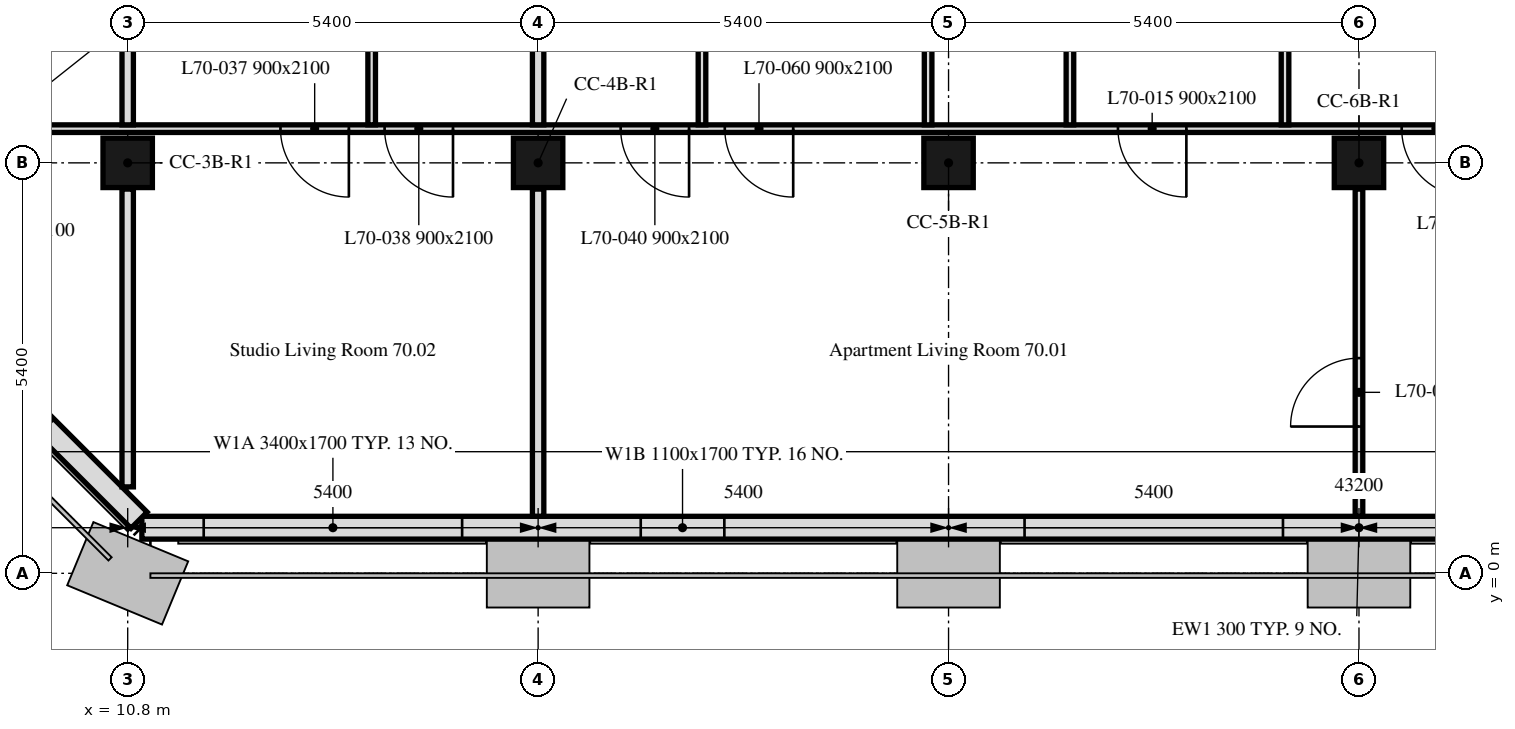
"""IFC4 building model, lengths in metres.
Left out: names, types, materials, properties, quantities, classifications, styles, units other than length and angle.
Written with IfcOpenShell. Run it as: python <this file> out.ifc"""

import sys

from ifc_helpers import new_model, si_unit, direction, frame, frame_2d, origin, origin_2d, place, context, subcontext, project, spatial, rectangle, extrude, element, fill, save


model = new_model("IFC4")
c1 = context("Model", 3, precision=1e-05, world=origin(), true_north=direction((0.0, 1.0)))
c2 = subcontext(c1, "Body", "Model", "MODEL_VIEW")
j1 = project(units=[si_unit("LENGTHUNIT", "METRE"), si_unit("PLANEANGLEUNIT", "RADIAN")], contexts=[c1])
p1 = place(None, origin())
s1 = spatial("IfcSite", under=j1, at=p1, CompositionType="ELEMENT")
p2 = place(p1, origin())
s2 = spatial("IfcBuilding", under=s1, at=p2, CompositionType="ELEMENT")
p3 = place(p2, frame((0.0, 0.0, 285.1)))
s3 = spatial("IfcBuildingStorey", under=s2, at=p3, CompositionType="ELEMENT", Elevation=285.1)
for number, where, z_axis, x_axis in (
    (1, (10.8, 5.4, 0.0), (0.0, 0.0, 1.0), (1.0, 0.0, 0.0)),
    (2, (16.2, 5.4, 0.0), (0.0, 0.0, 1.0), (1.0, 0.0, 0.0)),
    (3, (21.6, 5.4, 0.0), (0.0, 0.0, 1.0), (1.0, 0.0, 0.0)),
    (4, (27.0, 5.4, 0.0), (0.0, 0.0, 1.0), (1.0, 0.0, 0.0)),
):
    element("IfcColumn", number, at=place(p3, frame(where, z_axis=z_axis, x_axis=x_axis)), inside=s3, PredefinedType="COLUMN", context=c2, shape_type="SweptSolid", body=[
        extrude(rectangle(XDim=0.65, YDim=0.65, at=origin_2d()), origin(), (0.0, 0.0, 1.0), 3.0),
    ])
p4 = place(p3, frame((10.986, 0.6, 0.0), z_axis=(0.0, 0.0, 1.0), x_axis=(1.0, 0.0, 0.0)))
e5 = element("IfcWall", 5, at=p4, inside=s3, PredefinedType="SOLIDWALL", context=c2, shape_type="SweptSolid", body=[
    extrude(rectangle(XDim=32.027, YDim=0.3, at=frame_2d((16.014, 0.0))), origin(), (0.0, 0.0, 1.0), 3.0),
])
p5 = place(p4, frame((0.814, 0.0, 0.9)))
e6 = element("IfcOpeningElement", 6, at=p5, cuts=e5, PredefinedType="OPENING", context=c2, shape_type="SweptSolid", body=[
    extrude(rectangle(XDim=3.4, YDim=1.7, at=frame_2d((1.7, 0.85))), frame((0.0, 0.16, 0.0), z_axis=(0.0, -1.0, 0.0), x_axis=(1.0, 0.0, 0.0)), (0.0, 0.0, 1.0), 0.32),
])
p6 = place(p4, frame((6.564, 0.0, 0.9)))
e7 = element("IfcOpeningElement", 7, at=p6, cuts=e5, PredefinedType="OPENING", context=c2, shape_type="SweptSolid", body=[
    extrude(rectangle(XDim=1.1, YDim=1.7, at=frame_2d((0.55, 0.85))), frame((0.0, 0.16, 0.0), z_axis=(0.0, -1.0, 0.0), x_axis=(1.0, 0.0, 0.0)), (0.0, 0.0, 1.0), 0.32),
])
p7 = place(p4, frame((11.614, 0.0, 0.9)))
e8 = element("IfcOpeningElement", 8, at=p7, cuts=e5, PredefinedType="OPENING", context=c2, shape_type="SweptSolid", body=[
    extrude(rectangle(XDim=3.4, YDim=1.7, at=frame_2d((1.7, 0.85))), frame((0.0, 0.16, 0.0), z_axis=(0.0, -1.0, 0.0), x_axis=(1.0, 0.0, 0.0)), (0.0, 0.0, 1.0), 0.32),
])
p8 = place(p4, frame((17.364, 0.0, 0.9)))
e9 = element("IfcOpeningElement", 9, at=p8, cuts=e5, PredefinedType="OPENING", context=c2, shape_type="SweptSolid", body=[
    extrude(rectangle(XDim=1.1, YDim=1.7, at=frame_2d((0.55, 0.85))), frame((0.0, 0.16, 0.0), z_axis=(0.0, -1.0, 0.0), x_axis=(1.0, 0.0, 0.0)), (0.0, 0.0, 1.0), 0.32),
])
p9 = place(p4, frame((22.414, 0.0, 0.9)))
e10 = element("IfcOpeningElement", 10, at=p9, cuts=e5, PredefinedType="OPENING", context=c2, shape_type="SweptSolid", body=[
    extrude(rectangle(XDim=3.4, YDim=1.7, at=frame_2d((1.7, 0.85))), frame((0.0, 0.16, 0.0), z_axis=(0.0, -1.0, 0.0), x_axis=(1.0, 0.0, 0.0)), (0.0, 0.0, 1.0), 0.32),
])
p10 = place(p4, frame((28.164, 0.0, 0.9)))
e11 = element("IfcOpeningElement", 11, at=p10, cuts=e5, PredefinedType="OPENING", context=c2, shape_type="SweptSolid", body=[
    extrude(rectangle(XDim=1.1, YDim=1.7, at=frame_2d((0.55, 0.85))), frame((0.0, 0.16, 0.0), z_axis=(0.0, -1.0, 0.0), x_axis=(1.0, 0.0, 0.0)), (0.0, 0.0, 1.0), 0.32),
])
p11 = place(p3, frame((6.099, 5.55, 0.0), z_axis=(0.0, 0.0, 1.0), x_axis=(0.707106781187, -0.707106781187, 0.0)))
e12 = element("IfcWall", 12, at=p11, inside=s3, PredefinedType="SOLIDWALL", context=c2, shape_type="SweptSolid", body=[
    extrude(rectangle(XDim=6.86, YDim=0.3, at=frame_2d((3.43, 0.0))), origin(), (0.0, 0.0, 1.0), 3.0),
])
p12 = place(p11, frame((1.73, 0.0, 0.9)))
e13 = element("IfcOpeningElement", 13, at=p12, cuts=e12, PredefinedType="OPENING", context=c2, shape_type="SweptSolid", body=[
    extrude(rectangle(XDim=3.4, YDim=1.7, at=frame_2d((1.7, 0.85))), frame((0.0, 0.16, 0.0), z_axis=(0.0, -1.0, 0.0), x_axis=(1.0, 0.0, 0.0)), (0.0, 0.0, 1.0), 0.32),
])
p13 = place(p3, frame((10.8, 1.137, 0.0), z_axis=(0.0, 0.0, 1.0), x_axis=(0.0, 1.0, 0.0)))
e14 = element("IfcWall", 14, at=p13, inside=s3, PredefinedType="PARTITIONING", context=c2, shape_type="SweptSolid", body=[
    extrude(rectangle(XDim=3.918, YDim=0.15, at=frame_2d((1.959, 0.0))), origin(), (0.0, 0.0, 1.0), 3.0),
])
p14 = place(p3, frame((37.652, 5.85, 0.0), z_axis=(0.0, 0.0, 1.0), x_axis=(-1.0, 0.0, 0.0)))
e15 = element("IfcWall", 15, at=p14, inside=s3, PredefinedType="PARTITIONING", context=c2, shape_type="SweptSolid", body=[
    extrude(rectangle(XDim=31.501, YDim=0.1, at=frame_2d((15.75, 0.0))), origin(), (0.0, 0.0, 1.0), 2.4),
])
p15 = place(p14, frame((12.923, 0.0, 0.0)))
e16 = element("IfcOpeningElement", 16, at=p15, cuts=e15, PredefinedType="OPENING", context=c2, shape_type="SweptSolid", body=[
    extrude(rectangle(XDim=0.9, YDim=2.1, at=frame_2d((0.45, 1.05))), frame((0.0, 0.05, 0.0), z_axis=(0.0, -1.0, 0.0), x_axis=(1.0, 0.0, 0.0)), (0.0, 0.0, 1.0), 0.1),
])
p16 = place(p14, frame((29.422, 0.0, 0.0)))
e17 = element("IfcOpeningElement", 17, at=p16, cuts=e15, PredefinedType="OPENING", context=c2, shape_type="SweptSolid", body=[
    extrude(rectangle(XDim=0.9, YDim=2.1, at=frame_2d((0.45, 1.05))), frame((0.0, 0.05, 0.0), z_axis=(0.0, -1.0, 0.0), x_axis=(1.0, 0.0, 0.0)), (0.0, 0.0, 1.0), 0.1),
])
p17 = place(p14, frame((28.182, 0.0, 0.0)))
e18 = element("IfcOpeningElement", 18, at=p17, cuts=e15, PredefinedType="OPENING", context=c2, shape_type="SweptSolid", body=[
    extrude(rectangle(XDim=0.9, YDim=2.1, at=frame_2d((0.45, 1.05))), frame((0.0, 0.05, 0.0), z_axis=(0.0, -1.0, 0.0), x_axis=(1.0, 0.0, 0.0)), (0.0, 0.0, 1.0), 0.1),
])
p18 = place(p14, frame((23.942, 0.0, 0.0)))
e19 = element("IfcOpeningElement", 19, at=p18, cuts=e15, PredefinedType="OPENING", context=c2, shape_type="SweptSolid", body=[
    extrude(rectangle(XDim=0.9, YDim=2.1, at=frame_2d((0.45, 1.05))), frame((0.0, 0.05, 0.0), z_axis=(0.0, -1.0, 0.0), x_axis=(1.0, 0.0, 0.0)), (0.0, 0.0, 1.0), 0.1),
])
p19 = place(p14, frame((22.572, 0.0, 0.0)))
e20 = element("IfcOpeningElement", 20, at=p19, cuts=e15, PredefinedType="OPENING", context=c2, shape_type="SweptSolid", body=[
    extrude(rectangle(XDim=0.9, YDim=2.1, at=frame_2d((0.45, 1.05))), frame((0.0, 0.05, 0.0), z_axis=(0.0, -1.0, 0.0), x_axis=(1.0, 0.0, 0.0)), (0.0, 0.0, 1.0), 0.1),
])
p20 = place(p14, frame((19.466, 0.0, 0.0)))
e21 = element("IfcOpeningElement", 21, at=p20, cuts=e15, PredefinedType="OPENING", context=c2, shape_type="SweptSolid", body=[
    extrude(rectangle(XDim=0.9, YDim=2.1, at=frame_2d((0.45, 1.05))), frame((0.0, 0.05, 0.0), z_axis=(0.0, -1.0, 0.0), x_axis=(1.0, 0.0, 0.0)), (0.0, 0.0, 1.0), 0.1),
])
p21 = place(p14, frame((9.19, 0.0, 0.0)))
e22 = element("IfcOpeningElement", 22, at=p21, cuts=e15, PredefinedType="OPENING", context=c2, shape_type="SweptSolid", body=[
    extrude(rectangle(XDim=0.9, YDim=2.1, at=frame_2d((0.45, 1.05))), frame((0.0, 0.05, 0.0), z_axis=(0.0, -1.0, 0.0), x_axis=(1.0, 0.0, 0.0)), (0.0, 0.0, 1.0), 0.1),
])
p22 = place(p14, frame((7.512, 0.0, 0.0)))
e23 = element("IfcOpeningElement", 23, at=p22, cuts=e15, PredefinedType="OPENING", context=c2, shape_type="SweptSolid", body=[
    extrude(rectangle(XDim=0.9, YDim=2.1, at=frame_2d((0.45, 1.05))), frame((0.0, 0.05, 0.0), z_axis=(0.0, -1.0, 0.0), x_axis=(1.0, 0.0, 0.0)), (0.0, 0.0, 1.0), 0.1),
])
p23 = place(p14, frame((2.952, 0.0, 0.0)))
e24 = element("IfcOpeningElement", 24, at=p23, cuts=e15, PredefinedType="OPENING", context=c2, shape_type="SweptSolid", body=[
    extrude(rectangle(XDim=0.9, YDim=2.1, at=frame_2d((0.45, 1.05))), frame((0.0, 0.05, 0.0), z_axis=(0.0, -1.0, 0.0), x_axis=(1.0, 0.0, 0.0)), (0.0, 0.0, 1.0), 0.1),
])
p24 = place(p14, frame((18.096, 0.0, 0.0)))
e25 = element("IfcOpeningElement", 25, at=p24, cuts=e15, PredefinedType="OPENING", context=c2, shape_type="SweptSolid", body=[
    extrude(rectangle(XDim=0.9, YDim=2.1, at=frame_2d((0.45, 1.05))), frame((0.0, 0.05, 0.0), z_axis=(0.0, -1.0, 0.0), x_axis=(1.0, 0.0, 0.0)), (0.0, 0.0, 1.0), 0.1),
])
p25 = place(p3, frame((10.8, 5.9, 0.0), z_axis=(0.0, 0.0, 1.0), x_axis=(0.0, 1.0, 0.0)))
e26 = element("IfcWall", 26, at=p25, inside=s3, PredefinedType="PARTITIONING", context=c2, shape_type="SweptSolid", body=[
    extrude(rectangle(XDim=4.555, YDim=0.15, at=frame_2d((2.278, 0.0))), origin(), (0.0, 0.0, 1.0), 3.0),
])
p26 = place(p3, frame((16.2, 0.751, 0.0), z_axis=(0.0, 0.0, 1.0), x_axis=(0.0, 1.0, 0.0)))
e27 = element("IfcWall", 27, at=p26, inside=s3, PredefinedType="PARTITIONING", context=c2, shape_type="SweptSolid", body=[
    extrude(rectangle(XDim=4.304, YDim=0.15, at=frame_2d((2.152, 0.0))), origin(), (0.0, 0.0, 1.0), 2.4),
])
p27 = place(p3, frame((14.01, 5.9, 0.0), z_axis=(0.0, 0.0, 1.0), x_axis=(0.0, 1.0, 0.0)))
e28 = element("IfcWall", 28, at=p27, inside=s3, PredefinedType="PARTITIONING", context=c2, shape_type="SweptSolid", body=[
    extrude(rectangle(XDim=7.975, YDim=0.1, at=frame_2d((3.988, 0.0))), origin(), (0.0, 0.0, 1.0), 3.0),
])
p28 = place(p27, frame((6.825, 0.0, 0.0)))
e29 = element("IfcOpeningElement", 29, at=p28, cuts=e28, PredefinedType="OPENING", context=c2, shape_type="SweptSolid", body=[
    extrude(rectangle(XDim=0.9, YDim=2.1, at=frame_2d((0.45, 1.05))), frame((0.0, 0.05, 0.0), z_axis=(0.0, -1.0, 0.0), x_axis=(1.0, 0.0, 0.0)), (0.0, 0.0, 1.0), 0.1),
])
p29 = place(p27, frame((2.3, 0.0, 0.0)))
e30 = element("IfcOpeningElement", 30, at=p29, cuts=e28, PredefinedType="OPENING", context=c2, shape_type="SweptSolid", body=[
    extrude(rectangle(XDim=0.9, YDim=2.1, at=frame_2d((0.45, 1.05))), frame((0.0, 0.05, 0.0), z_axis=(0.0, -1.0, 0.0), x_axis=(1.0, 0.0, 0.0)), (0.0, 0.0, 1.0), 0.1),
])
p30 = place(p3, frame((16.2, 5.9, 0.0), z_axis=(0.0, 0.0, 1.0), x_axis=(0.0, 1.0, 0.0)))
e31 = element("IfcWall", 31, at=p30, inside=s3, PredefinedType="PARTITIONING", context=c2, shape_type="SweptSolid", body=[
    extrude(rectangle(XDim=4.555, YDim=0.15, at=frame_2d((2.278, 0.0))), origin(), (0.0, 0.0, 1.0), 2.4),
])
p31 = place(p3, frame((27.0, 0.751, 0.0), z_axis=(0.0, 0.0, 1.0), x_axis=(0.0, 1.0, 0.0)))
e32 = element("IfcWall", 32, at=p31, inside=s3, PredefinedType="PARTITIONING", context=c2, shape_type="SweptSolid", body=[
    extrude(rectangle(XDim=4.304, YDim=0.1, at=frame_2d((2.152, 0.0))), origin(), (0.0, 0.0, 1.0), 2.4),
])
p32 = place(p31, frame((1.18, 0.0, 0.0)))
e33 = element("IfcOpeningElement", 33, at=p32, cuts=e32, PredefinedType="OPENING", context=c2, shape_type="SweptSolid", body=[
    extrude(rectangle(XDim=0.9, YDim=2.1, at=frame_2d((0.45, 1.05))), frame((0.0, 0.05, 0.0), z_axis=(0.0, -1.0, 0.0), x_axis=(1.0, 0.0, 0.0)), (0.0, 0.0, 1.0), 0.1),
])
p33 = place(p3, frame((18.356, 5.9, 0.0), z_axis=(0.0, 0.0, 1.0), x_axis=(0.0, 1.0, 0.0)))
e34 = element("IfcWall", 34, at=p33, inside=s3, PredefinedType="PARTITIONING", context=c2, shape_type="SweptSolid", body=[
    extrude(rectangle(XDim=7.975, YDim=0.1, at=frame_2d((3.988, 0.0))), origin(), (0.0, 0.0, 1.0), 3.0),
])
p34 = place(p33, frame((6.558, 0.0, 0.0)))
e35 = element("IfcOpeningElement", 35, at=p34, cuts=e34, PredefinedType="OPENING", context=c2, shape_type="SweptSolid", body=[
    extrude(rectangle(XDim=0.9, YDim=2.1, at=frame_2d((0.45, 1.05))), frame((0.0, 0.05, 0.0), z_axis=(0.0, -1.0, 0.0), x_axis=(1.0, 0.0, 0.0)), (0.0, 0.0, 1.0), 0.1),
])
p35 = place(p33, frame((2.3, 0.0, 0.0)))
e36 = element("IfcOpeningElement", 36, at=p35, cuts=e34, PredefinedType="OPENING", context=c2, shape_type="SweptSolid", body=[
    extrude(rectangle(XDim=0.9, YDim=2.1, at=frame_2d((0.45, 1.05))), frame((0.0, 0.05, 0.0), z_axis=(0.0, -1.0, 0.0), x_axis=(1.0, 0.0, 0.0)), (0.0, 0.0, 1.0), 0.1),
])
p36 = place(p3, frame((21.331, 5.9, 0.0), z_axis=(0.0, 0.0, 1.0), x_axis=(0.0, 1.0, 0.0)))
e37 = element("IfcWall", 37, at=p36, inside=s3, PredefinedType="PARTITIONING", context=c2, shape_type="SweptSolid", body=[
    extrude(rectangle(XDim=4.555, YDim=0.1, at=frame_2d((2.278, 0.0))), origin(), (0.0, 0.0, 1.0), 3.0),
])
p37 = place(p36, frame((1.787, 0.0, 0.0)))
e38 = element("IfcOpeningElement", 38, at=p37, cuts=e37, PredefinedType="OPENING", context=c2, shape_type="SweptSolid", body=[
    extrude(rectangle(XDim=0.9, YDim=2.1, at=frame_2d((0.45, 1.05))), frame((0.0, 0.05, 0.0), z_axis=(0.0, -1.0, 0.0), x_axis=(1.0, 0.0, 0.0)), (0.0, 0.0, 1.0), 0.1),
])
for number, where, z_axis, x_axis in (
    (39, (23.197, 5.9, 0.0), (0.0, 0.0, 1.0), (0.0, 1.0, 0.0)),
    (40, (26.027, 5.9, 0.0), (0.0, 0.0, 1.0), (0.0, 1.0, 0.0)),
):
    element("IfcWall", number, at=place(p3, frame(where, z_axis=z_axis, x_axis=x_axis)), inside=s3, PredefinedType="PARTITIONING", context=c2, shape_type="SweptSolid", body=[
        extrude(rectangle(XDim=7.975, YDim=0.1, at=frame_2d((3.988, 0.0))), origin(), (0.0, 0.0, 1.0), 3.0),
    ])
p38 = place(p5, origin())
e41 = element("IfcWindow", 41, at=p38, inside=s3, PartitioningType="SINGLE_PANEL", PredefinedType="WINDOW", context=c2, shape_type="SweptSolid", body=[
    extrude(rectangle(XDim=3.4, YDim=1.7, at=frame_2d((1.7, 0.85))), frame((0.0, 0.03, 0.0), z_axis=(0.0, -1.0, 0.0), x_axis=(1.0, 0.0, 0.0)), (0.0, 0.0, 1.0), 0.06),
])
fill(e6, e41)
p39 = place(p6, origin())
e42 = element("IfcWindow", 42, at=p39, inside=s3, PartitioningType="SINGLE_PANEL", PredefinedType="WINDOW", context=c2, shape_type="SweptSolid", body=[
    extrude(rectangle(XDim=1.1, YDim=1.7, at=frame_2d((0.55, 0.85))), frame((0.0, 0.03, 0.0), z_axis=(0.0, -1.0, 0.0), x_axis=(1.0, 0.0, 0.0)), (0.0, 0.0, 1.0), 0.06),
])
fill(e7, e42)
p40 = place(p7, origin())
e43 = element("IfcWindow", 43, at=p40, inside=s3, PartitioningType="SINGLE_PANEL", PredefinedType="WINDOW", context=c2, shape_type="SweptSolid", body=[
    extrude(rectangle(XDim=3.4, YDim=1.7, at=frame_2d((1.7, 0.85))), frame((0.0, 0.03, 0.0), z_axis=(0.0, -1.0, 0.0), x_axis=(1.0, 0.0, 0.0)), (0.0, 0.0, 1.0), 0.06),
])
fill(e8, e43)
p41 = place(p15, origin())
e44 = element("IfcDoor", 44, at=p41, inside=s3, OperationType="SINGLE_SWING_RIGHT", PredefinedType="DOOR", context=c2, shape_type="SweptSolid", body=[
    extrude(rectangle(XDim=0.9, YDim=2.1, at=frame_2d((0.45, 1.05))), frame((0.0, 0.025, 0.0), z_axis=(0.0, -1.0, 0.0), x_axis=(1.0, 0.0, 0.0)), (0.0, 0.0, 1.0), 0.05),
])
fill(e16, e44)
p42 = place(p18, origin())
e45 = element("IfcDoor", 45, at=p42, inside=s3, OperationType="SINGLE_SWING_LEFT", PredefinedType="DOOR", context=c2, shape_type="SweptSolid", body=[
    extrude(rectangle(XDim=0.9, YDim=2.1, at=frame_2d((0.45, 1.05))), frame((0.0, 0.025, 0.0), z_axis=(0.0, -1.0, 0.0), x_axis=(1.0, 0.0, 0.0)), (0.0, 0.0, 1.0), 0.05),
])
fill(e19, e45)
p43 = place(p19, origin())
e46 = element("IfcDoor", 46, at=p43, inside=s3, OperationType="SINGLE_SWING_RIGHT", PredefinedType="DOOR", context=c2, shape_type="SweptSolid", body=[
    extrude(rectangle(XDim=0.9, YDim=2.1, at=frame_2d((0.45, 1.05))), frame((0.0, 0.025, 0.0), z_axis=(0.0, -1.0, 0.0), x_axis=(1.0, 0.0, 0.0)), (0.0, 0.0, 1.0), 0.05),
])
fill(e20, e46)
p44 = place(p20, origin())
e47 = element("IfcDoor", 47, at=p44, inside=s3, OperationType="SINGLE_SWING_LEFT", PredefinedType="DOOR", context=c2, shape_type="SweptSolid", body=[
    extrude(rectangle(XDim=0.9, YDim=2.1, at=frame_2d((0.45, 1.05))), frame((0.0, 0.025, 0.0), z_axis=(0.0, -1.0, 0.0), x_axis=(1.0, 0.0, 0.0)), (0.0, 0.0, 1.0), 0.05),
])
fill(e21, e47)
p45 = place(p21, origin())
e48 = element("IfcDoor", 48, at=p45, inside=s3, OperationType="SINGLE_SWING_LEFT", PredefinedType="DOOR", context=c2, shape_type="SweptSolid", body=[
    extrude(rectangle(XDim=0.9, YDim=2.1, at=frame_2d((0.45, 1.05))), frame((0.0, 0.025, 0.0), z_axis=(0.0, -1.0, 0.0), x_axis=(1.0, 0.0, 0.0)), (0.0, 0.0, 1.0), 0.05),
])
fill(e22, e48)
p46 = place(p32, origin())
e49 = element("IfcDoor", 49, at=p46, inside=s3, OperationType="SINGLE_SWING_RIGHT", PredefinedType="DOOR", context=c2, shape_type="SweptSolid", body=[
    extrude(rectangle(XDim=0.9, YDim=2.1, at=frame_2d((0.45, 1.05))), frame((0.0, 0.025, 0.0), z_axis=(0.0, -1.0, 0.0), x_axis=(1.0, 0.0, 0.0)), (0.0, 0.0, 1.0), 0.05),
])
fill(e33, e49)
p47 = place(p24, origin())
e50 = element("IfcDoor", 50, at=p47, inside=s3, OperationType="SINGLE_SWING_RIGHT", PredefinedType="DOOR", context=c2, shape_type="SweptSolid", body=[
    extrude(rectangle(XDim=0.9, YDim=2.1, at=frame_2d((0.45, 1.05))), frame((0.0, 0.025, 0.0), z_axis=(0.0, -1.0, 0.0), x_axis=(1.0, 0.0, 0.0)), (0.0, 0.0, 1.0), 0.05),
])
fill(e25, e50)
save(model, sys.argv[1])
